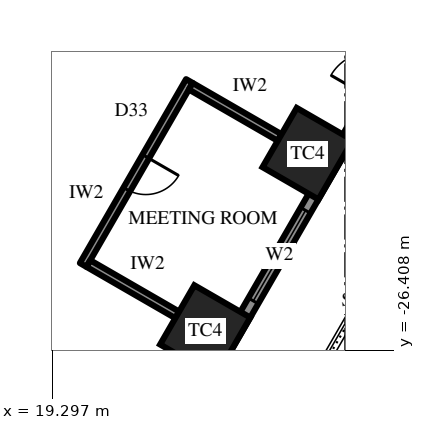
"""IFC4 building model, lengths in metres.
Left out: names, types, materials, properties, quantities, classifications, styles, units other than length and angle.
Written with IfcOpenShell. Run it as: python <this file> out.ifc"""

import sys

from ifc_helpers import new_model, si_unit, direction, frame, frame_2d, origin, origin_2d, place, context, subcontext, project, spatial, rectangle, extrude, element, fill, save


model = new_model("IFC4")
c1 = context("Model", 3, precision=1e-05, world=origin(), true_north=direction((0.0, 1.0)))
c2 = subcontext(c1, "Body", "Model", "MODEL_VIEW")
j1 = project(units=[si_unit("LENGTHUNIT", "METRE"), si_unit("PLANEANGLEUNIT", "RADIAN")], contexts=[c1])
p1 = place(None, origin())
s1 = spatial("IfcSite", under=j1, at=p1, CompositionType="ELEMENT")
p2 = place(p1, origin())
s2 = spatial("IfcBuilding", under=s1, at=p2, CompositionType="ELEMENT")
p3 = place(p2, frame((0.0, 0.0, 94.9)))
s3 = spatial("IfcBuildingStorey", under=s2, at=p3, CompositionType="ELEMENT", Elevation=94.9)
for number, where, z_axis, x_axis in (
    (1, (23.32, -25.908, 0.0), (0.0, 0.0, 1.0), (0.5, 0.866, 0.0)),
    (2, (26.014, -21.242, 0.0), (0.0, 0.0, 1.0), (0.5, 0.866, 0.0)),
):
    element("IfcColumn", number, at=place(p3, frame(where, z_axis=z_axis, x_axis=x_axis)), inside=s3, PredefinedType="COLUMN", context=c2, shape_type="SweptSolid", body=[
        extrude(rectangle(XDim=1.8, YDim=1.7, at=origin_2d()), origin(), (0.0, 0.0, 1.0), 4.2),
    ])
p4 = place(p3, frame((21.232, -30.925, 0.0), z_axis=(0.0, 0.0, 1.0), x_axis=(0.499999163675, 0.866025886636, 0.0)))
e3 = element("IfcWall", 3, at=p4, inside=s3, PredefinedType="SOLIDWALL", context=c2, shape_type="SweptSolid", body=[
    extrude(rectangle(XDim=32.332, YDim=0.3, at=frame_2d((16.166, 0.0))), origin(), (0.0, 0.0, 1.0), 2.7),
])
p5 = place(p4, frame((1.319, 0.0, 0.6)))
e4 = element("IfcOpeningElement", 4, at=p5, cuts=e3, PredefinedType="OPENING", context=c2, shape_type="SweptSolid", body=[
    extrude(rectangle(XDim=2.75, YDim=1.85, at=frame_2d((1.375, 0.925))), frame((0.0, 0.16, 0.0), z_axis=(0.0, -1.0, 0.0), x_axis=(1.0, 0.0, 0.0)), (0.0, 0.0, 1.0), 0.32),
])
p6 = place(p4, frame((6.708, 0.0, 0.6)))
e5 = element("IfcOpeningElement", 5, at=p6, cuts=e3, PredefinedType="OPENING", context=c2, shape_type="SweptSolid", body=[
    extrude(rectangle(XDim=2.75, YDim=1.85, at=frame_2d((1.375, 0.925))), frame((0.0, 0.16, 0.0), z_axis=(0.0, -1.0, 0.0), x_axis=(1.0, 0.0, 0.0)), (0.0, 0.0, 1.0), 0.32),
])
p7 = place(p4, frame((12.872, 0.0, 0.0)))
e6 = element("IfcOpeningElement", 6, at=p7, cuts=e3, PredefinedType="OPENING", context=c2, shape_type="SweptSolid", body=[
    extrude(rectangle(XDim=1.2, YDim=2.4, at=frame_2d((0.6, 1.2))), frame((0.0, 0.16, 0.0), z_axis=(0.0, -1.0, 0.0), x_axis=(1.0, 0.0, 0.0)), (0.0, 0.0, 1.0), 0.32),
])
p8 = place(p4, frame((17.485, 0.0, 0.6)))
e7 = element("IfcOpeningElement", 7, at=p8, cuts=e3, PredefinedType="OPENING", context=c2, shape_type="SweptSolid", body=[
    extrude(rectangle(XDim=2.75, YDim=1.85, at=frame_2d((1.375, 0.925))), frame((0.0, 0.16, 0.0), z_axis=(0.0, -1.0, 0.0), x_axis=(1.0, 0.0, 0.0)), (0.0, 0.0, 1.0), 0.32),
])
p9 = place(p4, frame((22.874, 0.0, 0.6)))
e8 = element("IfcOpeningElement", 8, at=p9, cuts=e3, PredefinedType="OPENING", context=c2, shape_type="SweptSolid", body=[
    extrude(rectangle(XDim=2.75, YDim=1.85, at=frame_2d((1.375, 0.925))), frame((0.0, 0.16, 0.0), z_axis=(0.0, -1.0, 0.0), x_axis=(1.0, 0.0, 0.0)), (0.0, 0.0, 1.0), 0.32),
])
p10 = place(p4, frame((28.262, 0.0, 0.6)))
e9 = element("IfcOpeningElement", 9, at=p10, cuts=e3, PredefinedType="OPENING", context=c2, shape_type="SweptSolid", body=[
    extrude(rectangle(XDim=2.75, YDim=1.85, at=frame_2d((1.375, 0.925))), frame((0.0, 0.16, 0.0), z_axis=(0.0, -1.0, 0.0), x_axis=(1.0, 0.0, 0.0)), (0.0, 0.0, 1.0), 0.32),
])
p11 = place(p3, frame((20.109, -24.17, 0.0), z_axis=(0.0, 0.0, 1.0), x_axis=(0.50001992892, 0.866013897511, 0.0)))
e10 = element("IfcWall", 10, at=p11, inside=s3, PredefinedType="PARTITIONING", context=c2, shape_type="SweptSolid", body=[
    extrude(rectangle(XDim=5.589, YDim=0.2, at=frame_2d((2.794, 0.0))), origin(), (0.0, 0.0, 1.0), 4.0),
])
p12 = place(p11, frame((2.294, 0.0, 0.0)))
e11 = element("IfcOpeningElement", 11, at=p12, cuts=e10, PredefinedType="OPENING", context=c2, shape_type="SweptSolid", body=[
    extrude(rectangle(XDim=1.0, YDim=2.2, at=frame_2d((0.5, 1.1))), frame((0.0, 0.11, 0.0), z_axis=(0.0, -1.0, 0.0), x_axis=(1.0, 0.0, 0.0)), (0.0, 0.0, 1.0), 0.22),
])
p13 = place(p3, frame((20.246, -24.133, 0.0), z_axis=(0.0, 0.0, 1.0), x_axis=(0.86599734893, -0.500048589285, 0.0)))
e12 = element("IfcWall", 12, at=p13, inside=s3, PredefinedType="PARTITIONING", context=c2, shape_type="SweptSolid", body=[
    extrude(rectangle(XDim=2.7, YDim=0.2, at=frame_2d((1.35, 0.0))), origin(), (0.0, 0.0, 1.0), 2.992),
])
p14 = place(p3, frame((22.94, -19.467, 0.0), z_axis=(0.0, 0.0, 1.0), x_axis=(0.866019956843, -0.50000943426, 0.0)))
e13 = element("IfcWall", 13, at=p14, inside=s3, PredefinedType="PARTITIONING", context=c2, shape_type="SweptSolid", body=[
    extrude(rectangle(XDim=2.7, YDim=0.2, at=frame_2d((1.35, 0.0))), origin(), (0.0, 0.0, 1.0), 2.992),
])
p15 = place(p6, origin())
e14 = element("IfcWindow", 14, at=p15, inside=s3, PartitioningType="SINGLE_PANEL", PredefinedType="WINDOW", context=c2, shape_type="SweptSolid", body=[
    extrude(rectangle(XDim=2.75, YDim=1.85, at=frame_2d((1.375, 0.925))), frame((0.0, 0.03, 0.0), z_axis=(0.0, -1.0, 0.0), x_axis=(1.0, 0.0, 0.0)), (0.0, 0.0, 1.0), 0.06),
])
fill(e5, e14)
p16 = place(p12, frame((1.0, 0.0, 0.0), z_axis=(0.0, 0.0, 1.0), x_axis=(-1.0, 0.0, 0.0)))
e15 = element("IfcDoor", 15, at=p16, inside=s3, OperationType="SINGLE_SWING_RIGHT", PredefinedType="DOOR", context=c2, shape_type="SweptSolid", body=[
    extrude(rectangle(XDim=1.0, YDim=2.2, at=frame_2d((0.5, 1.1))), frame((0.0, 0.025, 0.0), z_axis=(0.0, -1.0, 0.0), x_axis=(1.0, 0.0, 0.0)), (0.0, 0.0, 1.0), 0.05),
])
fill(e11, e15)
save(model, sys.argv[1])
